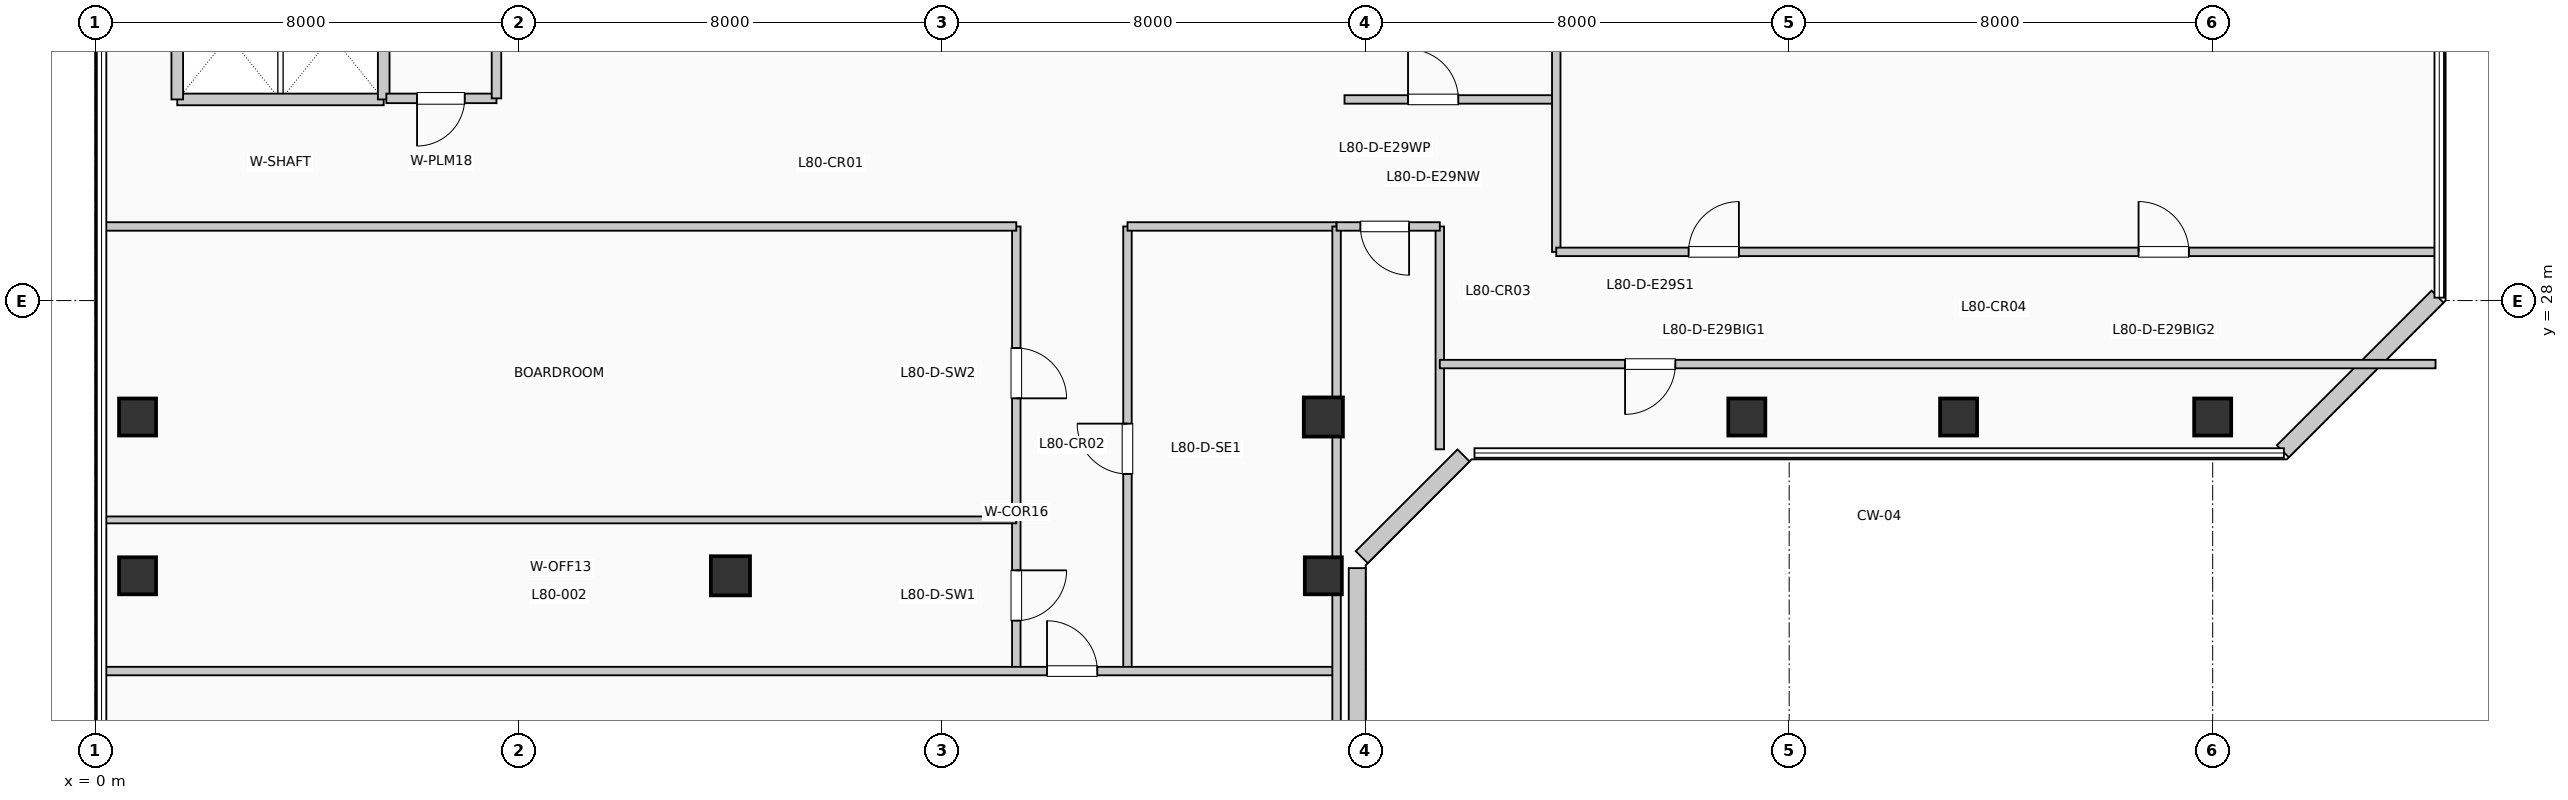
"""IFC4 building model, lengths in metres.
Left out: names, types, materials, properties, quantities, classifications, styles, units other than length and angle.
Written with IfcOpenShell. Run it as: python <this file> out.ifc"""

import sys

from ifc_helpers import new_model, si_unit, direction, frame, frame_2d, origin, origin_2d, place, context, subcontext, project, spatial, rectangle, extrude, element, fill, save


model = new_model("IFC4")
c1 = context("Model", 3, precision=1e-05, world=origin(), true_north=direction((0.0, 1.0)))
c2 = subcontext(c1, "Body", "Model", "MODEL_VIEW")
j1 = project(units=[si_unit("LENGTHUNIT", "METRE"), si_unit("PLANEANGLEUNIT", "RADIAN")], contexts=[c1])
p1 = place(None, origin())
s1 = spatial("IfcSite", under=j1, at=p1, CompositionType="ELEMENT")
p2 = place(p1, origin())
s2 = spatial("IfcBuilding", under=s1, at=p2, CompositionType="ELEMENT")
p3 = place(p2, frame((0.0, 0.0, 327.69)))
s3 = spatial("IfcBuildingStorey", under=s2, at=p3, CompositionType="ELEMENT", Elevation=327.69)
for number, where, z_axis, x_axis in (
    (1, (0.8, 22.8, 0.0), (0.0, 0.0, 1.0), (1.0, 0.0, 0.0)),
    (2, (0.8, 25.8, 0.0), (0.0, 0.0, 1.0), (1.0, 0.0, 0.0)),
):
    element("IfcColumn", number, at=place(p3, frame(where, z_axis=z_axis, x_axis=x_axis)), inside=s3, PredefinedType="COLUMN", context=c2, shape_type="SweptSolid", body=[
        extrude(rectangle(XDim=0.7, YDim=0.7, at=origin_2d()), origin(), (0.0, 0.0, 1.0), 3.96),
    ])
p4 = place(p3, frame((12.0, 22.8, 0.0), z_axis=(0.0, 0.0, 1.0), x_axis=(1.0, 0.0, 0.0)))
e3 = element("IfcColumn", 3, at=p4, inside=s3, PredefinedType="COLUMN", context=c2, shape_type="SweptSolid", body=[
    extrude(rectangle(XDim=0.74, YDim=0.74, at=origin_2d()), origin(), (0.0, 0.0, 1.0), 3.96),
])
p5 = place(p3, frame((23.2, 22.8, 0.0), z_axis=(0.0, 0.0, 1.0), x_axis=(1.0, 0.0, 0.0)))
e4 = element("IfcColumn", 4, at=p5, inside=s3, PredefinedType="COLUMN", context=c2, shape_type="SweptSolid", body=[
    extrude(rectangle(XDim=0.7, YDim=0.7, at=origin_2d()), origin(), (0.0, 0.0, 1.0), 3.96),
])
p6 = place(p3, frame((23.2, 25.8, 0.0), z_axis=(0.0, 0.0, 1.0), x_axis=(1.0, 0.0, 0.0)))
e5 = element("IfcColumn", 5, at=p6, inside=s3, PredefinedType="COLUMN", context=c2, shape_type="SweptSolid", body=[
    extrude(rectangle(XDim=0.74, YDim=0.74, at=origin_2d()), origin(), (0.0, 0.0, 1.0), 3.96),
])
for number, where, z_axis, x_axis in (
    (6, (31.2, 25.8, 0.0), (0.0, 0.0, 1.0), (1.0, 0.0, 0.0)),
    (7, (35.2, 25.8, 0.0), (0.0, 0.0, 1.0), (1.0, 0.0, 0.0)),
    (8, (40.0, 25.8, 0.0), (0.0, 0.0, 1.0), (1.0, 0.0, 0.0)),
):
    element("IfcColumn", number, at=place(p3, frame(where, z_axis=z_axis, x_axis=x_axis)), inside=s3, PredefinedType="COLUMN", context=c2, shape_type="SweptSolid", body=[
        extrude(rectangle(XDim=0.7, YDim=0.7, at=origin_2d()), origin(), (0.0, 0.0, 1.0), 3.96),
    ])
p7 = place(p3, frame((23.84, 8.855, 0.0), z_axis=(0.0, 0.0, 1.0), x_axis=(0.0, 1.0, 0.0)))
e9 = element("IfcWall", 9, at=p7, inside=s3, PredefinedType="SOLIDWALL", context=c2, shape_type="SweptSolid", body=[
    extrude(rectangle(XDim=14.09, YDim=0.32, at=frame_2d((7.045, 0.0))), origin(), (0.0, 0.0, 1.0), 3.74),
])
p8 = place(p3, frame((23.926, 23.152, 0.0), z_axis=(0.0, 0.0, 1.0), x_axis=(0.707106781187, 0.707106781187, 0.0)))
e10 = element("IfcWall", 10, at=p8, inside=s3, PredefinedType="SOLIDWALL", context=c2, shape_type="SweptSolid", body=[
    extrude(rectangle(XDim=2.718, YDim=0.32, at=frame_2d((1.359, 0.0))), origin(), (0.0, 0.0, 1.0), 3.74),
])
p9 = place(p3, frame((41.326, 25.152, 0.0), z_axis=(0.0, 0.0, 1.0), x_axis=(0.707136318428, 0.707077242712, 0.0)))
e11 = element("IfcWall", 11, at=p9, inside=s3, PredefinedType="SOLIDWALL", context=c2, shape_type="SweptSolid", body=[
    extrude(rectangle(XDim=4.133, YDim=0.32, at=frame_2d((2.066, 0.0))), origin(), (0.0, 0.0, 1.0), 3.74),
])
p10 = place(p3, frame((1.55, 31.8, 0.0), z_axis=(0.0, 0.0, 1.0), x_axis=(1.0, 0.0, 0.0)))
e12 = element("IfcWall", 12, at=p10, inside=s3, PredefinedType="PARTITIONING", context=c2, shape_type="SweptSolid", body=[
    extrude(rectangle(XDim=3.9, YDim=0.22, at=frame_2d((1.95, 0.0))), origin(), (0.0, 0.0, 1.0), 3.74),
])
for number, where, z_axis, x_axis in (
    (13, (1.55, 31.8, 0.0), (0.0, 0.0, 1.0), (0.0, 1.0, 0.0)),
    (14, (5.45, 31.8, 0.0), (0.0, 0.0, 1.0), (0.0, 1.0, 0.0)),
):
    element("IfcWall", number, at=place(p3, frame(where, z_axis=z_axis, x_axis=x_axis)), inside=s3, PredefinedType="PARTITIONING", context=c2, shape_type="SweptSolid", body=[
        extrude(rectangle(XDim=2.38, YDim=0.22, at=frame_2d((1.19, 0.0))), origin(), (0.0, 0.0, 1.0), 3.74),
    ])
p11 = place(p3, frame((5.5, 31.82, 0.0), z_axis=(0.0, 0.0, 1.0), x_axis=(1.0, 0.0, 0.0)))
e15 = element("IfcWall", 15, at=p11, inside=s3, PredefinedType="PLUMBINGWALL", context=c2, shape_type="SweptSolid", body=[
    extrude(rectangle(XDim=2.08, YDim=0.18, at=frame_2d((1.04, 0.0))), origin(), (0.0, 0.0, 1.0), 3.74),
])
p12 = place(p11, frame((1.48, 0.0, 0.0), z_axis=(0.0, 0.0, 1.0), x_axis=(-1.0, 0.0, 0.0)))
e16 = element("IfcOpeningElement", 16, at=p12, cuts=e15, PredefinedType="OPENING", context=c2, shape_type="SweptSolid", body=[
    extrude(rectangle(XDim=0.9, YDim=2.1, at=frame_2d((0.45, 1.05))), frame((0.0, 0.1, 0.0), z_axis=(0.0, -1.0, 0.0), x_axis=(1.0, 0.0, 0.0)), (0.0, 0.0, 1.0), 0.2),
])
p13 = place(p3, frame((7.58, 31.82, 0.0), z_axis=(0.0, 0.0, 1.0), x_axis=(0.0, 1.0, 0.0)))
e17 = element("IfcWall", 17, at=p13, inside=s3, PredefinedType="PLUMBINGWALL", context=c2, shape_type="SweptSolid", body=[
    extrude(rectangle(XDim=2.36, YDim=0.18, at=frame_2d((1.18, 0.0))), origin(), (0.0, 0.0, 1.0), 3.74),
])
p14 = place(p3, frame((17.4, 21.0, 0.0), z_axis=(0.0, 0.0, 1.0), x_axis=(0.0, 1.0, 0.0)))
e18 = element("IfcWall", 18, at=p14, inside=s3, PredefinedType="PARTITIONING", context=c2, shape_type="SweptSolid", body=[
    extrude(rectangle(XDim=8.4, YDim=0.16, at=frame_2d((4.2, 0.0))), origin(), (0.0, 0.0, 1.0), 3.74),
])
p15 = place(p14, frame((1.903, 0.0, 0.0), z_axis=(0.0, 0.0, 1.0), x_axis=(-1.0, 0.0, 0.0)))
e19 = element("IfcOpeningElement", 19, at=p15, cuts=e18, PredefinedType="OPENING", context=c2, shape_type="SweptSolid", body=[
    extrude(rectangle(XDim=0.95, YDim=2.15, at=frame_2d((0.475, 1.075))), frame((0.0, 0.09, 0.0), z_axis=(0.0, -1.0, 0.0), x_axis=(1.0, 0.0, 0.0)), (0.0, 0.0, 1.0), 0.18),
])
p16 = place(p14, frame((6.103, 0.0, 0.0), z_axis=(0.0, 0.0, 1.0), x_axis=(-1.0, 0.0, 0.0)))
e20 = element("IfcOpeningElement", 20, at=p16, cuts=e18, PredefinedType="OPENING", context=c2, shape_type="SweptSolid", body=[
    extrude(rectangle(XDim=0.95, YDim=2.15, at=frame_2d((0.475, 1.075))), frame((0.0, 0.09, 0.0), z_axis=(0.0, -1.0, 0.0), x_axis=(1.0, 0.0, 0.0)), (0.0, 0.0, 1.0), 0.18),
])
p17 = place(p3, frame((19.5, 21.0, 0.0), z_axis=(0.0, 0.0, 1.0), x_axis=(0.0, 1.0, 0.0)))
e21 = element("IfcWall", 21, at=p17, inside=s3, PredefinedType="PARTITIONING", context=c2, shape_type="SweptSolid", body=[
    extrude(rectangle(XDim=8.4, YDim=0.16, at=frame_2d((4.2, 0.0))), origin(), (0.0, 0.0, 1.0), 3.74),
])
p18 = place(p17, frame((3.725, 0.0, 0.0)))
e22 = element("IfcOpeningElement", 22, at=p18, cuts=e21, PredefinedType="OPENING", context=c2, shape_type="SweptSolid", body=[
    extrude(rectangle(XDim=0.95, YDim=2.15, at=frame_2d((0.475, 1.075))), frame((0.0, 0.09, 0.0), z_axis=(0.0, -1.0, 0.0), x_axis=(1.0, 0.0, 0.0)), (0.0, 0.0, 1.0), 0.18),
])
p19 = place(p3, frame((0.19, 21.0, 0.0), z_axis=(0.0, 0.0, 1.0), x_axis=(1.0, 0.0, 0.0)))
e23 = element("IfcWall", 23, at=p19, inside=s3, PredefinedType="PARTITIONING", context=c2, shape_type="SweptSolid", body=[
    extrude(rectangle(XDim=23.26, YDim=0.16, at=frame_2d((11.63, 0.0))), origin(), (0.0, 0.0, 1.0), 3.74),
])
p20 = place(p19, frame((17.79, 0.0, 0.0)))
e24 = element("IfcOpeningElement", 24, at=p20, cuts=e23, PredefinedType="OPENING", context=c2, shape_type="SweptSolid", body=[
    extrude(rectangle(XDim=0.95, YDim=2.15, at=frame_2d((0.475, 1.075))), frame((0.0, 0.09, 0.0), z_axis=(0.0, -1.0, 0.0), x_axis=(1.0, 0.0, 0.0)), (0.0, 0.0, 1.0), 0.18),
])
p21 = place(p3, frame((0.19, 29.4, 0.0), z_axis=(0.0, 0.0, 1.0), x_axis=(1.0, 0.0, 0.0)))
e25 = element("IfcWall", 25, at=p21, inside=s3, PredefinedType="PARTITIONING", context=c2, shape_type="SweptSolid", body=[
    extrude(rectangle(XDim=17.21, YDim=0.16, at=frame_2d((8.605, 0.0))), origin(), (0.0, 0.0, 1.0), 3.425),
])
p22 = place(p3, frame((19.5, 29.4, 0.0), z_axis=(0.0, 0.0, 1.0), x_axis=(1.0, 0.0, 0.0)))
e26 = element("IfcWall", 26, at=p22, inside=s3, PredefinedType="PARTITIONING", context=c2, shape_type="SweptSolid", body=[
    extrude(rectangle(XDim=3.95, YDim=0.16, at=frame_2d((1.975, 0.0))), origin(), (0.0, 0.0, 1.0), 3.425),
])
p23 = place(p3, frame((23.45, 6.84, 0.0), z_axis=(0.0, 0.0, 1.0), x_axis=(0.0, 1.0, 0.0)))
e27 = element("IfcWall", 27, at=p23, inside=s3, PredefinedType="PARTITIONING", context=c2, shape_type="SweptSolid", body=[
    extrude(rectangle(XDim=22.56, YDim=0.16, at=frame_2d((11.28, 0.0))), origin(), (0.0, 0.0, 1.0), 3.175),
])
p24 = place(p3, frame((0.19, 23.856, 0.0), z_axis=(0.0, 0.0, 1.0), x_axis=(1.0, 0.0, 0.0)))
e28 = element("IfcWall", 28, at=p24, inside=s3, PredefinedType="PARTITIONING", context=c2, shape_type="SweptSolid", body=[
    extrude(rectangle(XDim=17.21, YDim=0.13, at=frame_2d((8.605, 0.0))), origin(), (0.0, 0.0, 1.0), 3.74),
])
p25 = place(p3, frame((25.4, 25.19, 0.0), z_axis=(0.0, 0.0, 1.0), x_axis=(0.0, 1.0, 0.0)))
e29 = element("IfcWall", 29, at=p25, inside=s3, PredefinedType="PARTITIONING", context=c2, shape_type="SweptSolid", body=[
    extrude(rectangle(XDim=4.21, YDim=0.16, at=frame_2d((2.105, 0.0))), origin(), (0.0, 0.0, 1.0), 3.74),
])
p26 = place(p3, frame((23.6, 31.8, 0.0), z_axis=(0.0, 0.0, 1.0), x_axis=(1.0, 0.0, 0.0)))
e30 = element("IfcWall", 30, at=p26, inside=s3, PredefinedType="PARTITIONING", context=c2, shape_type="SweptSolid", body=[
    extrude(rectangle(XDim=4.0, YDim=0.16, at=frame_2d((2.0, 0.0))), origin(), (0.0, 0.0, 1.0), 3.74),
])
p27 = place(p26, frame((1.2, 0.0, 0.0)))
e31 = element("IfcOpeningElement", 31, at=p27, cuts=e30, PredefinedType="OPENING", context=c2, shape_type="SweptSolid", body=[
    extrude(rectangle(XDim=0.95, YDim=2.15, at=frame_2d((0.475, 1.075))), frame((0.0, 0.09, 0.0), z_axis=(0.0, -1.0, 0.0), x_axis=(1.0, 0.0, 0.0)), (0.0, 0.0, 1.0), 0.18),
])
p28 = place(p3, frame((27.6, 28.92, 0.0), z_axis=(0.0, 0.0, 1.0), x_axis=(0.0, 1.0, 0.0)))
e32 = element("IfcWall", 32, at=p28, inside=s3, PredefinedType="PARTITIONING", context=c2, shape_type="SweptSolid", body=[
    extrude(rectangle(XDim=16.89, YDim=0.16, at=frame_2d((8.445, 0.0))), origin(), (0.0, 0.0, 1.0), 3.74),
])
p29 = place(p3, frame((25.4, 26.8, 0.0), z_axis=(0.0, 0.0, 1.0), x_axis=(1.0, 0.0, 0.0)))
e33 = element("IfcWall", 33, at=p29, inside=s3, PredefinedType="PARTITIONING", context=c2, shape_type="SweptSolid", body=[
    extrude(rectangle(XDim=18.81, YDim=0.16, at=frame_2d((9.405, 0.0))), origin(), (0.0, 0.0, 1.0), 3.74),
])
p30 = place(p29, frame((4.45, 0.0, 0.0), z_axis=(0.0, 0.0, 1.0), x_axis=(-1.0, 0.0, 0.0)))
e34 = element("IfcOpeningElement", 34, at=p30, cuts=e33, PredefinedType="OPENING", context=c2, shape_type="SweptSolid", body=[
    extrude(rectangle(XDim=0.95, YDim=2.15, at=frame_2d((0.475, 1.075))), frame((0.0, 0.09, 0.0), z_axis=(0.0, -1.0, 0.0), x_axis=(1.0, 0.0, 0.0)), (0.0, 0.0, 1.0), 0.18),
])
p31 = place(p3, frame((27.6, 28.92, 0.0), z_axis=(0.0, 0.0, 1.0), x_axis=(1.0, 0.0, 0.0)))
e35 = element("IfcWall", 35, at=p31, inside=s3, PredefinedType="PARTITIONING", context=c2, shape_type="SweptSolid", body=[
    extrude(rectangle(XDim=16.61, YDim=0.16, at=frame_2d((8.305, 0.0))), origin(), (0.0, 0.0, 1.0), 3.74),
])
p32 = place(p31, frame((2.5, 0.0, 0.0)))
e36 = element("IfcOpeningElement", 36, at=p32, cuts=e35, PredefinedType="OPENING", context=c2, shape_type="SweptSolid", body=[
    extrude(rectangle(XDim=0.95, YDim=2.15, at=frame_2d((0.475, 1.075))), frame((0.0, 0.09, 0.0), z_axis=(0.0, -1.0, 0.0), x_axis=(1.0, 0.0, 0.0)), (0.0, 0.0, 1.0), 0.18),
])
p33 = place(p31, frame((11.0, 0.0, 0.0)))
e37 = element("IfcOpeningElement", 37, at=p33, cuts=e35, PredefinedType="OPENING", context=c2, shape_type="SweptSolid", body=[
    extrude(rectangle(XDim=0.95, YDim=2.15, at=frame_2d((0.475, 1.075))), frame((0.0, 0.09, 0.0), z_axis=(0.0, -1.0, 0.0), x_axis=(1.0, 0.0, 0.0)), (0.0, 0.0, 1.0), 0.18),
])
p34 = place(p3, frame((23.45, 29.4, 0.0), z_axis=(0.0, 0.0, 1.0), x_axis=(1.0, 0.0, 0.0)))
e38 = element("IfcWall", 38, at=p34, inside=s3, PredefinedType="PARTITIONING", context=c2, shape_type="SweptSolid", body=[
    extrude(rectangle(XDim=1.95, YDim=0.16, at=frame_2d((0.975, 0.0))), origin(), (0.0, 0.0, 1.0), 3.425),
])
p35 = place(p34, frame((1.37, 0.0, 0.0), z_axis=(0.0, 0.0, 1.0), x_axis=(-1.0, 0.0, 0.0)))
e39 = element("IfcOpeningElement", 39, at=p35, cuts=e38, PredefinedType="OPENING", context=c2, shape_type="SweptSolid", body=[
    extrude(rectangle(XDim=0.92, YDim=2.1, at=frame_2d((0.46, 1.05))), frame((0.0, 0.09, 0.0), z_axis=(0.0, -1.0, 0.0), x_axis=(1.0, 0.0, 0.0)), (0.0, 0.0, 1.0), 0.18),
])
p36 = place(p12, origin())
e40 = element("IfcDoor", 40, at=p36, inside=s3, OperationType="SINGLE_SWING_LEFT", PredefinedType="DOOR", context=c2, shape_type="SweptSolid", body=[
    extrude(rectangle(XDim=0.9, YDim=2.1, at=frame_2d((0.45, 1.05))), frame((0.0, 0.025, 0.0), z_axis=(0.0, -1.0, 0.0), x_axis=(1.0, 0.0, 0.0)), (0.0, 0.0, 1.0), 0.05),
])
fill(e16, e40)
p37 = place(p20, origin())
e41 = element("IfcDoor", 41, at=p37, inside=s3, OperationType="SINGLE_SWING_LEFT", PredefinedType="DOOR", context=c2, shape_type="SweptSolid", body=[
    extrude(rectangle(XDim=0.95, YDim=2.15, at=frame_2d((0.475, 1.075))), frame((0.0, 0.025, 0.0), z_axis=(0.0, -1.0, 0.0), x_axis=(1.0, 0.0, 0.0)), (0.0, 0.0, 1.0), 0.05),
])
fill(e24, e41)
p38 = place(p15, origin())
e42 = element("IfcDoor", 42, at=p38, inside=s3, OperationType="SINGLE_SWING_RIGHT", PredefinedType="DOOR", context=c2, shape_type="SweptSolid", body=[
    extrude(rectangle(XDim=0.95, YDim=2.15, at=frame_2d((0.475, 1.075))), frame((0.0, 0.025, 0.0), z_axis=(0.0, -1.0, 0.0), x_axis=(1.0, 0.0, 0.0)), (0.0, 0.0, 1.0), 0.05),
])
fill(e19, e42)
p39 = place(p16, origin())
e43 = element("IfcDoor", 43, at=p39, inside=s3, OperationType="SINGLE_SWING_LEFT", PredefinedType="DOOR", context=c2, shape_type="SweptSolid", body=[
    extrude(rectangle(XDim=0.95, YDim=2.15, at=frame_2d((0.475, 1.075))), frame((0.0, 0.025, 0.0), z_axis=(0.0, -1.0, 0.0), x_axis=(1.0, 0.0, 0.0)), (0.0, 0.0, 1.0), 0.05),
])
fill(e20, e43)
p40 = place(p18, origin())
e44 = element("IfcDoor", 44, at=p40, inside=s3, OperationType="SINGLE_SWING_RIGHT", PredefinedType="DOOR", context=c2, shape_type="SweptSolid", body=[
    extrude(rectangle(XDim=0.95, YDim=2.15, at=frame_2d((0.475, 1.075))), frame((0.0, 0.025, 0.0), z_axis=(0.0, -1.0, 0.0), x_axis=(1.0, 0.0, 0.0)), (0.0, 0.0, 1.0), 0.05),
])
fill(e22, e44)
p41 = place(p27, origin())
e45 = element("IfcDoor", 45, at=p41, inside=s3, OperationType="SINGLE_SWING_LEFT", PredefinedType="DOOR", context=c2, shape_type="SweptSolid", body=[
    extrude(rectangle(XDim=0.95, YDim=2.15, at=frame_2d((0.475, 1.075))), frame((0.0, 0.025, 0.0), z_axis=(0.0, -1.0, 0.0), x_axis=(1.0, 0.0, 0.0)), (0.0, 0.0, 1.0), 0.05),
])
fill(e31, e45)
p42 = place(p32, origin())
e46 = element("IfcDoor", 46, at=p42, inside=s3, OperationType="SINGLE_SWING_RIGHT", PredefinedType="DOOR", context=c2, shape_type="SweptSolid", body=[
    extrude(rectangle(XDim=0.95, YDim=2.15, at=frame_2d((0.475, 1.075))), frame((0.0, 0.025, 0.0), z_axis=(0.0, -1.0, 0.0), x_axis=(1.0, 0.0, 0.0)), (0.0, 0.0, 1.0), 0.05),
])
fill(e36, e46)
p43 = place(p33, origin())
e47 = element("IfcDoor", 47, at=p43, inside=s3, OperationType="SINGLE_SWING_LEFT", PredefinedType="DOOR", context=c2, shape_type="SweptSolid", body=[
    extrude(rectangle(XDim=0.95, YDim=2.15, at=frame_2d((0.475, 1.075))), frame((0.0, 0.025, 0.0), z_axis=(0.0, -1.0, 0.0), x_axis=(1.0, 0.0, 0.0)), (0.0, 0.0, 1.0), 0.05),
])
fill(e37, e47)
p44 = place(p35, origin())
e48 = element("IfcDoor", 48, at=p44, inside=s3, OperationType="SINGLE_SWING_RIGHT", PredefinedType="DOOR", context=c2, shape_type="SweptSolid", body=[
    extrude(rectangle(XDim=0.92, YDim=2.1, at=frame_2d((0.46, 1.05))), frame((0.0, 0.025, 0.0), z_axis=(0.0, -1.0, 0.0), x_axis=(1.0, 0.0, 0.0)), (0.0, 0.0, 1.0), 0.05),
])
fill(e39, e48)
p45 = place(p30, origin())
e49 = element("IfcDoor", 49, at=p45, inside=s3, OperationType="SINGLE_SWING_LEFT", PredefinedType="DOOR", context=c2, shape_type="SweptSolid", body=[
    extrude(rectangle(XDim=0.95, YDim=2.15, at=frame_2d((0.475, 1.075))), frame((0.0, 0.025, 0.0), z_axis=(0.0, -1.0, 0.0), x_axis=(1.0, 0.0, 0.0)), (0.0, 0.0, 1.0), 0.05),
])
fill(e34, e49)
save(model, sys.argv[1])
